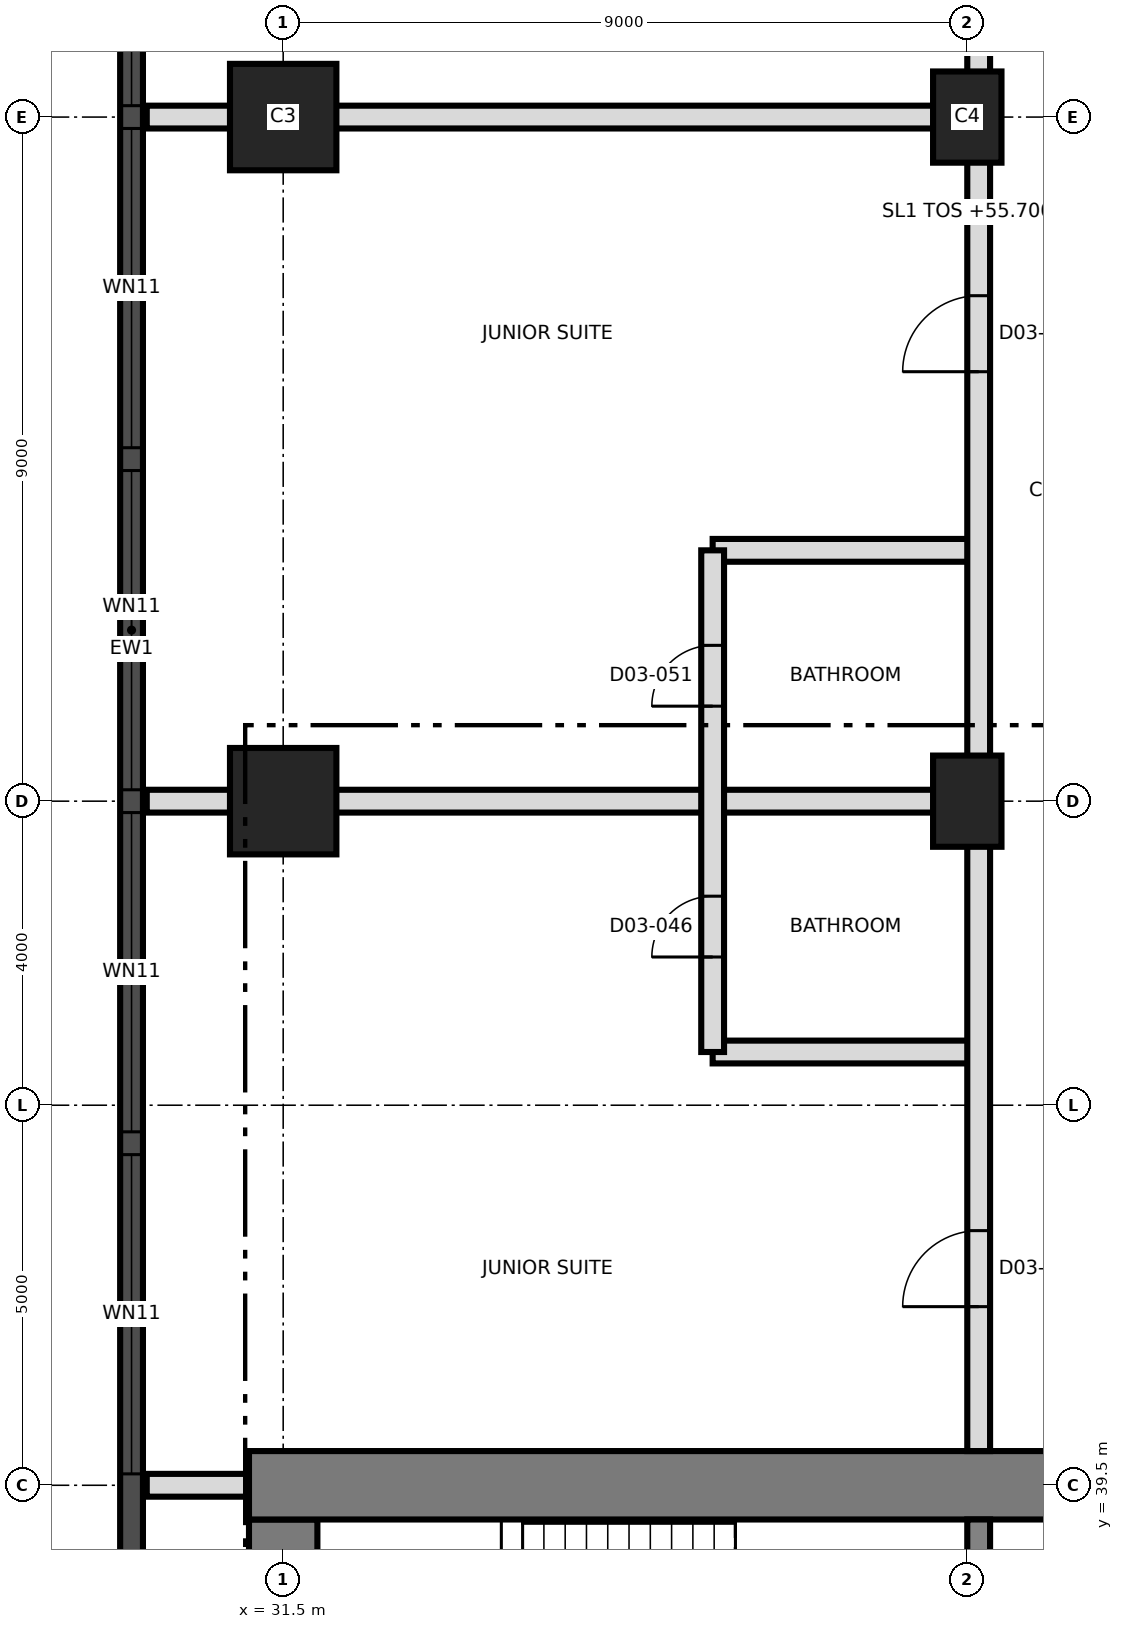
"""IFC4 building model, lengths in metres.
Left out: names, types, materials, properties, quantities, classifications, styles, units other than length and angle.
Written with IfcOpenShell. Run it as: python <this file> out.ifc"""

import sys

from ifc_helpers import new_model, si_unit, direction, frame, frame_2d, origin, origin_2d, place, context, subcontext, project, spatial, rectangle, extrude, element, fill, save


model = new_model("IFC4")
c1 = context("Model", 3, precision=1e-05, world=origin(), true_north=direction((0.0, 1.0)))
c2 = subcontext(c1, "Body", "Model", "MODEL_VIEW")
j1 = project(units=[si_unit("LENGTHUNIT", "METRE"), si_unit("PLANEANGLEUNIT", "RADIAN")], contexts=[c1])
p1 = place(None, origin())
s1 = spatial("IfcSite", under=j1, at=p1, CompositionType="ELEMENT")
p2 = place(p1, origin())
s2 = spatial("IfcBuilding", under=s1, at=p2, CompositionType="ELEMENT")
p3 = place(p2, frame((0.0, 0.0, 55.7)))
s3 = spatial("IfcBuildingStorey", under=s2, at=p3, CompositionType="ELEMENT", Elevation=55.7)
p4 = place(p3, frame((31.5, 21.95, 0.0), z_axis=(0.0, 0.0, 1.0), x_axis=(0.0, 1.0, 0.0)))
e1 = element("IfcWall", 1, at=p4, inside=s3, PredefinedType="SHEAR", context=c2, shape_type="SweptSolid", body=[
    extrude(rectangle(XDim=17.1, YDim=0.9, at=frame_2d((8.55, 0.0))), origin(), (0.0, 0.0, 1.0), 3.7),
])
p5 = place(p3, frame((31.05, 39.5, 0.0), z_axis=(0.0, 0.0, 1.0), x_axis=(1.0, 0.0, 0.0)))
e2 = element("IfcWall", 2, at=p5, inside=s3, PredefinedType="SHEAR", context=c2, shape_type="SweptSolid", body=[
    extrude(rectangle(XDim=27.0, YDim=0.9, at=frame_2d((13.5, 0.0))), origin(), (0.0, 0.0, 1.0), 3.7),
])
p6 = place(p5, frame((10.65, 0.0, 0.0)))
e3 = element("IfcOpeningElement", 3, at=p6, cuts=e2, PredefinedType="OPENING", context=c2, shape_type="SweptSolid", body=[
    extrude(rectangle(XDim=1.2, YDim=2.1, at=frame_2d((0.6, 1.05))), frame((0.0, 0.46, 0.0), z_axis=(0.0, -1.0, 0.0), x_axis=(1.0, 0.0, 0.0)), (0.0, 0.0, 1.0), 0.92),
])
p7 = place(p3, frame((40.65, 33.5, 0.0), z_axis=(0.0, 0.0, 1.0), x_axis=(0.0, 1.0, 0.0)))
e4 = element("IfcWall", 4, at=p7, inside=s3, PredefinedType="SHEAR", context=c2, shape_type="SweptSolid", body=[
    extrude(rectangle(XDim=5.55, YDim=0.3, at=frame_2d((2.775, 0.0))), origin(), (0.0, 0.0, 1.0), 3.7),
])
p8 = place(p3, frame((31.5, 48.5, 0.0), z_axis=(0.0, 0.0, 1.0), x_axis=(1.0, 0.0, 0.0)))
e5 = element("IfcColumn", 5, at=p8, inside=s3, PredefinedType="COLUMN", context=c2, shape_type="SweptSolid", body=[
    extrude(rectangle(XDim=1.4, YDim=1.4, at=origin_2d()), origin(), (0.0, 0.0, 1.0), 3.7),
])
p9 = place(p3, frame((40.5, 48.5, 0.0), z_axis=(0.0, 0.0, 1.0), x_axis=(0.0, 1.0, 0.0)))
e6 = element("IfcColumn", 6, at=p9, inside=s3, PredefinedType="COLUMN", context=c2, shape_type="SweptSolid", body=[
    extrude(rectangle(XDim=1.2, YDim=0.9, at=origin_2d()), origin(), (0.0, 0.0, 1.0), 3.7),
])
p10 = place(p3, frame((31.5, 57.5, 0.0), z_axis=(0.0, 0.0, 1.0), x_axis=(1.0, 0.0, 0.0)))
e7 = element("IfcColumn", 7, at=p10, inside=s3, PredefinedType="COLUMN", context=c2, shape_type="SweptSolid", body=[
    extrude(rectangle(XDim=1.4, YDim=1.4, at=origin_2d()), origin(), (0.0, 0.0, 1.0), 3.7),
])
p11 = place(p3, frame((40.5, 57.5, 0.0), z_axis=(0.0, 0.0, 1.0), x_axis=(0.0, 1.0, 0.0)))
e8 = element("IfcColumn", 8, at=p11, inside=s3, PredefinedType="COLUMN", context=c2, shape_type="SweptSolid", body=[
    extrude(rectangle(XDim=1.2, YDim=0.9, at=origin_2d()), origin(), (0.0, 0.0, 1.0), 3.7),
])
p12 = place(p3, frame((29.505, 66.986, 0.0), z_axis=(0.0, 0.0, 1.0), x_axis=(0.0, -1.0, 0.0)))
e9 = element("IfcWall", 9, at=p12, inside=s3, PredefinedType="SOLIDWALL", context=c2, shape_type="SweptSolid", body=[
    extrude(rectangle(XDim=32.976, YDim=0.3, at=frame_2d((16.488, 0.0))), origin(), (0.0, 0.0, 1.0), 3.4),
])
p13 = place(p12, frame((1.593, 0.0, 0.3)))
e10 = element("IfcOpeningElement", 10, at=p13, cuts=e9, PredefinedType="OPENING", context=c2, shape_type="SweptSolid", body=[
    extrude(rectangle(XDim=1.8, YDim=2.4, at=frame_2d((0.9, 1.2))), frame((0.0, 0.16, 0.0), z_axis=(0.0, -1.0, 0.0), x_axis=(1.0, 0.0, 0.0)), (0.0, 0.0, 1.0), 0.32),
])
p14 = place(p12, frame((5.136, 0.0, 0.9)))
e11 = element("IfcOpeningElement", 11, at=p14, cuts=e9, PredefinedType="OPENING", context=c2, shape_type="SweptSolid", body=[
    extrude(rectangle(XDim=4.2, YDim=1.5, at=frame_2d((2.1, 0.75))), frame((0.0, 0.16, 0.0), z_axis=(0.0, -1.0, 0.0), x_axis=(1.0, 0.0, 0.0)), (0.0, 0.0, 1.0), 0.32),
])
p15 = place(p12, frame((9.636, 0.0, 0.9)))
e12 = element("IfcOpeningElement", 12, at=p15, cuts=e9, PredefinedType="OPENING", context=c2, shape_type="SweptSolid", body=[
    extrude(rectangle(XDim=4.2, YDim=1.5, at=frame_2d((2.1, 0.75))), frame((0.0, 0.16, 0.0), z_axis=(0.0, -1.0, 0.0), x_axis=(1.0, 0.0, 0.0)), (0.0, 0.0, 1.0), 0.32),
])
p16 = place(p12, frame((14.136, 0.0, 0.9)))
e13 = element("IfcOpeningElement", 13, at=p16, cuts=e9, PredefinedType="OPENING", context=c2, shape_type="SweptSolid", body=[
    extrude(rectangle(XDim=4.2, YDim=1.5, at=frame_2d((2.1, 0.75))), frame((0.0, 0.16, 0.0), z_axis=(0.0, -1.0, 0.0), x_axis=(1.0, 0.0, 0.0)), (0.0, 0.0, 1.0), 0.32),
])
p17 = place(p12, frame((18.636, 0.0, 0.9)))
e14 = element("IfcOpeningElement", 14, at=p17, cuts=e9, PredefinedType="OPENING", context=c2, shape_type="SweptSolid", body=[
    extrude(rectangle(XDim=4.2, YDim=1.5, at=frame_2d((2.1, 0.75))), frame((0.0, 0.16, 0.0), z_axis=(0.0, -1.0, 0.0), x_axis=(1.0, 0.0, 0.0)), (0.0, 0.0, 1.0), 0.32),
])
p18 = place(p12, frame((23.136, 0.0, 0.9)))
e15 = element("IfcOpeningElement", 15, at=p18, cuts=e9, PredefinedType="OPENING", context=c2, shape_type="SweptSolid", body=[
    extrude(rectangle(XDim=4.2, YDim=1.5, at=frame_2d((2.1, 0.75))), frame((0.0, 0.16, 0.0), z_axis=(0.0, -1.0, 0.0), x_axis=(1.0, 0.0, 0.0)), (0.0, 0.0, 1.0), 0.32),
])
p19 = place(p12, frame((29.331, 0.0, 0.3)))
e16 = element("IfcOpeningElement", 16, at=p19, cuts=e9, PredefinedType="OPENING", context=c2, shape_type="SweptSolid", body=[
    extrude(rectangle(XDim=1.8, YDim=2.4, at=frame_2d((0.9, 1.2))), frame((0.0, 0.16, 0.0), z_axis=(0.0, -1.0, 0.0), x_axis=(1.0, 0.0, 0.0)), (0.0, 0.0, 1.0), 0.32),
])
p20 = place(p3, frame((29.705, 39.5, 0.0), z_axis=(0.0, 0.0, 1.0), x_axis=(1.0, 0.0, 0.0)))
e17 = element("IfcWall", 17, at=p20, inside=s3, PredefinedType="PARTITIONING", context=c2, shape_type="SweptSolid", body=[
    extrude(rectangle(XDim=1.325, YDim=0.3, at=frame_2d((0.663, 0.0))), origin(), (0.0, 0.0, 1.0), 3.4),
])
p21 = place(p3, frame((37.15, 45.2, 0.0), z_axis=(0.0, 0.0, 1.0), x_axis=(1.0, 0.0, 0.0)))
e18 = element("IfcWall", 18, at=p21, inside=s3, PredefinedType="PARTITIONING", context=c2, shape_type="SweptSolid", body=[
    extrude(rectangle(XDim=3.5, YDim=0.3, at=frame_2d((1.75, 0.0))), origin(), (0.0, 0.0, 1.0), 3.4),
])
p22 = place(p3, frame((29.705, 48.5, 0.0), z_axis=(0.0, 0.0, 1.0), x_axis=(1.0, 0.0, 0.0)))
e19 = element("IfcWall", 19, at=p22, inside=s3, PredefinedType="PARTITIONING", context=c2, shape_type="SweptSolid", body=[
    extrude(rectangle(XDim=10.945, YDim=0.3, at=frame_2d((5.472, 0.0))), origin(), (0.0, 0.0, 1.0), 3.4),
])
p23 = place(p3, frame((37.15, 51.8, 0.0), z_axis=(0.0, 0.0, 1.0), x_axis=(1.0, 0.0, 0.0)))
e20 = element("IfcWall", 20, at=p23, inside=s3, PredefinedType="PARTITIONING", context=c2, shape_type="SweptSolid", body=[
    extrude(rectangle(XDim=3.5, YDim=0.3, at=frame_2d((1.75, 0.0))), origin(), (0.0, 0.0, 1.0), 3.4),
])
p24 = place(p3, frame((29.705, 57.5, 0.0), z_axis=(0.0, 0.0, 1.0), x_axis=(1.0, 0.0, 0.0)))
e21 = element("IfcWall", 21, at=p24, inside=s3, PredefinedType="PARTITIONING", context=c2, shape_type="SweptSolid", body=[
    extrude(rectangle(XDim=10.945, YDim=0.3, at=frame_2d((5.472, 0.0))), origin(), (0.0, 0.0, 1.0), 3.4),
])
p25 = place(p3, frame((37.15, 45.2, 0.0), z_axis=(0.0, 0.0, 1.0), x_axis=(0.0, 1.0, 0.0)))
e22 = element("IfcWall", 22, at=p25, inside=s3, PredefinedType="PARTITIONING", context=c2, shape_type="SweptSolid", body=[
    extrude(rectangle(XDim=6.6, YDim=0.3, at=frame_2d((3.3, 0.0))), origin(), (0.0, 0.0, 1.0), 3.4),
])
p26 = place(p25, frame((1.25, 0.0, 0.0)))
e23 = element("IfcOpeningElement", 23, at=p26, cuts=e22, PredefinedType="OPENING", context=c2, shape_type="SweptSolid", body=[
    extrude(rectangle(XDim=0.8, YDim=2.1, at=frame_2d((0.4, 1.05))), frame((0.0, 0.16, 0.0), z_axis=(0.0, -1.0, 0.0), x_axis=(1.0, 0.0, 0.0)), (0.0, 0.0, 1.0), 0.32),
])
p27 = place(p25, frame((4.55, 0.0, 0.0)))
e24 = element("IfcOpeningElement", 24, at=p27, cuts=e22, PredefinedType="OPENING", context=c2, shape_type="SweptSolid", body=[
    extrude(rectangle(XDim=0.8, YDim=2.1, at=frame_2d((0.4, 1.05))), frame((0.0, 0.16, 0.0), z_axis=(0.0, -1.0, 0.0), x_axis=(1.0, 0.0, 0.0)), (0.0, 0.0, 1.0), 0.32),
])
p28 = place(p3, frame((40.65, 39.95, 0.0), z_axis=(0.0, 0.0, 1.0), x_axis=(0.0, 1.0, 0.0)))
e25 = element("IfcWall", 25, at=p28, inside=s3, PredefinedType="PARTITIONING", context=c2, shape_type="SweptSolid", body=[
    extrude(rectangle(XDim=37.05, YDim=0.3, at=frame_2d((18.525, 0.0))), origin(), (0.0, 0.0, 1.0), 3.4),
])
p29 = place(p28, frame((1.9, 0.0, 0.0)))
e26 = element("IfcOpeningElement", 26, at=p29, cuts=e25, PredefinedType="OPENING", context=c2, shape_type="SweptSolid", body=[
    extrude(rectangle(XDim=1.0, YDim=2.4, at=frame_2d((0.5, 1.2))), frame((0.0, 0.16, 0.0), z_axis=(0.0, -1.0, 0.0), x_axis=(1.0, 0.0, 0.0)), (0.0, 0.0, 1.0), 0.32),
])
p30 = place(p28, frame((14.2, 0.0, 0.0)))
e27 = element("IfcOpeningElement", 27, at=p30, cuts=e25, PredefinedType="OPENING", context=c2, shape_type="SweptSolid", body=[
    extrude(rectangle(XDim=1.0, YDim=2.4, at=frame_2d((0.5, 1.2))), frame((0.0, 0.16, 0.0), z_axis=(0.0, -1.0, 0.0), x_axis=(1.0, 0.0, 0.0)), (0.0, 0.0, 1.0), 0.32),
])
p31 = place(p28, frame((21.05, 0.0, 0.0)))
e28 = element("IfcOpeningElement", 28, at=p31, cuts=e25, PredefinedType="OPENING", context=c2, shape_type="SweptSolid", body=[
    extrude(rectangle(XDim=1.0, YDim=2.4, at=frame_2d((0.5, 1.2))), frame((0.0, 0.16, 0.0), z_axis=(0.0, -1.0, 0.0), x_axis=(1.0, 0.0, 0.0)), (0.0, 0.0, 1.0), 0.32),
])
p32 = place(p14, origin())
e29 = element("IfcWindow", 29, at=p32, inside=s3, PartitioningType="SINGLE_PANEL", PredefinedType="WINDOW", context=c2, shape_type="SweptSolid", body=[
    extrude(rectangle(XDim=4.2, YDim=1.5, at=frame_2d((2.1, 0.75))), frame((0.0, 0.03, 0.0), z_axis=(0.0, -1.0, 0.0), x_axis=(1.0, 0.0, 0.0)), (0.0, 0.0, 1.0), 0.06),
])
fill(e11, e29)
p33 = place(p15, origin())
e30 = element("IfcWindow", 30, at=p33, inside=s3, PartitioningType="SINGLE_PANEL", PredefinedType="WINDOW", context=c2, shape_type="SweptSolid", body=[
    extrude(rectangle(XDim=4.2, YDim=1.5, at=frame_2d((2.1, 0.75))), frame((0.0, 0.03, 0.0), z_axis=(0.0, -1.0, 0.0), x_axis=(1.0, 0.0, 0.0)), (0.0, 0.0, 1.0), 0.06),
])
fill(e12, e30)
p34 = place(p16, origin())
e31 = element("IfcWindow", 31, at=p34, inside=s3, PartitioningType="SINGLE_PANEL", PredefinedType="WINDOW", context=c2, shape_type="SweptSolid", body=[
    extrude(rectangle(XDim=4.2, YDim=1.5, at=frame_2d((2.1, 0.75))), frame((0.0, 0.03, 0.0), z_axis=(0.0, -1.0, 0.0), x_axis=(1.0, 0.0, 0.0)), (0.0, 0.0, 1.0), 0.06),
])
fill(e13, e31)
p35 = place(p17, origin())
e32 = element("IfcWindow", 32, at=p35, inside=s3, PartitioningType="SINGLE_PANEL", PredefinedType="WINDOW", context=c2, shape_type="SweptSolid", body=[
    extrude(rectangle(XDim=4.2, YDim=1.5, at=frame_2d((2.1, 0.75))), frame((0.0, 0.03, 0.0), z_axis=(0.0, -1.0, 0.0), x_axis=(1.0, 0.0, 0.0)), (0.0, 0.0, 1.0), 0.06),
])
fill(e14, e32)
p36 = place(p18, origin())
e33 = element("IfcWindow", 33, at=p36, inside=s3, PartitioningType="SINGLE_PANEL", PredefinedType="WINDOW", context=c2, shape_type="SweptSolid", body=[
    extrude(rectangle(XDim=4.2, YDim=1.5, at=frame_2d((2.1, 0.75))), frame((0.0, 0.03, 0.0), z_axis=(0.0, -1.0, 0.0), x_axis=(1.0, 0.0, 0.0)), (0.0, 0.0, 1.0), 0.06),
])
fill(e15, e33)
p37 = place(p26, origin())
e34 = element("IfcDoor", 34, at=p37, inside=s3, OperationType="SINGLE_SWING_LEFT", PredefinedType="DOOR", context=c2, shape_type="SweptSolid", body=[
    extrude(rectangle(XDim=0.8, YDim=2.1, at=frame_2d((0.4, 1.05))), frame((0.0, 0.025, 0.0), z_axis=(0.0, -1.0, 0.0), x_axis=(1.0, 0.0, 0.0)), (0.0, 0.0, 1.0), 0.05),
])
fill(e23, e34)
p38 = place(p29, origin())
e35 = element("IfcDoor", 35, at=p38, inside=s3, OperationType="SINGLE_SWING_RIGHT", PredefinedType="DOOR", context=c2, shape_type="SweptSolid", body=[
    extrude(rectangle(XDim=1.0, YDim=2.4, at=frame_2d((0.5, 1.2))), frame((0.0, 0.025, 0.0), z_axis=(0.0, -1.0, 0.0), x_axis=(1.0, 0.0, 0.0)), (0.0, 0.0, 1.0), 0.05),
])
fill(e26, e35)
p39 = place(p27, origin())
e36 = element("IfcDoor", 36, at=p39, inside=s3, OperationType="SINGLE_SWING_RIGHT", PredefinedType="DOOR", context=c2, shape_type="SweptSolid", body=[
    extrude(rectangle(XDim=0.8, YDim=2.1, at=frame_2d((0.4, 1.05))), frame((0.0, 0.025, 0.0), z_axis=(0.0, -1.0, 0.0), x_axis=(1.0, 0.0, 0.0)), (0.0, 0.0, 1.0), 0.05),
])
fill(e24, e36)
p40 = place(p30, origin())
e37 = element("IfcDoor", 37, at=p40, inside=s3, OperationType="SINGLE_SWING_LEFT", PredefinedType="DOOR", context=c2, shape_type="SweptSolid", body=[
    extrude(rectangle(XDim=1.0, YDim=2.4, at=frame_2d((0.5, 1.2))), frame((0.0, 0.025, 0.0), z_axis=(0.0, -1.0, 0.0), x_axis=(1.0, 0.0, 0.0)), (0.0, 0.0, 1.0), 0.05),
])
fill(e27, e37)
save(model, sys.argv[1])
